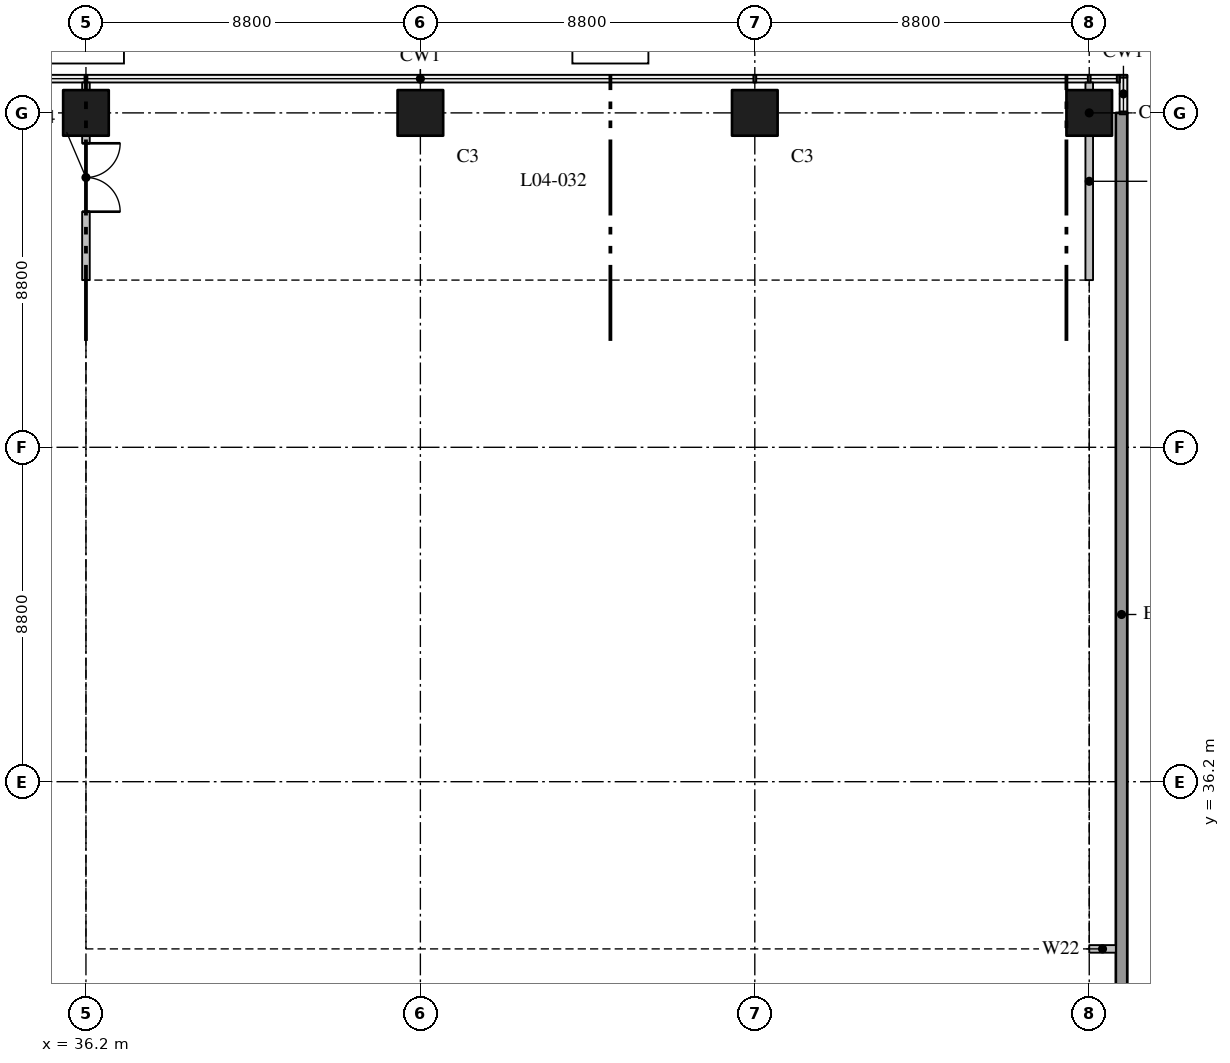
"""IFC4 building model, lengths in metres.
Left out: names, types, materials, properties, quantities, classifications, styles, units other than length and angle.
Written with IfcOpenShell. Run it as: python <this file> out.ifc"""

import sys

from ifc_helpers import new_model, si_unit, direction, frame, frame_2d, origin, origin_2d, place, context, subcontext, project, spatial, rectangle, extrude, element, fill, save


model = new_model("IFC4")
c1 = context("Model", 3, precision=1e-05, world=origin(), true_north=direction((0.0, 1.0)))
c2 = subcontext(c1, "Body", "Model", "MODEL_VIEW")
j1 = project(units=[si_unit("LENGTHUNIT", "METRE"), si_unit("PLANEANGLEUNIT", "RADIAN")], contexts=[c1])
p1 = place(None, origin())
s1 = spatial("IfcSite", under=j1, at=p1, CompositionType="ELEMENT")
p2 = place(p1, origin())
s2 = spatial("IfcBuilding", under=s1, at=p2, CompositionType="ELEMENT")
p3 = place(p2, frame((0.0, 0.0, 23.5)))
s3 = spatial("IfcBuildingStorey", under=s2, at=p3, CompositionType="ELEMENT", Elevation=23.5)
for number, where, z_axis, x_axis in (
    (1, (36.2, 53.8, 0.0), (0.0, 0.0, 1.0), (1.0, 0.0, 0.0)),
    (2, (45.0, 53.8, 0.0), (0.0, 0.0, 1.0), (1.0, 0.0, 0.0)),
    (3, (53.8, 53.8, 0.0), (0.0, 0.0, 1.0), (1.0, 0.0, 0.0)),
    (4, (62.6, 53.8, 0.0), (0.0, 0.0, 1.0), (1.0, 0.0, 0.0)),
):
    element("IfcColumn", number, at=place(p3, frame(where, z_axis=z_axis, x_axis=x_axis)), inside=s3, PredefinedType="COLUMN", context=c2, shape_type="SweptSolid", body=[
        extrude(rectangle(XDim=1.2, YDim=1.2, at=origin_2d()), origin(), (0.0, 0.0, 1.0), 5.5),
    ])
p4 = place(p3, frame((63.45, 27.4, 0.0), z_axis=(0.0, 0.0, 1.0), x_axis=(0.0, 1.0, 0.0)))
e5 = element("IfcWall", 5, at=p4, inside=s3, PredefinedType="STANDARD", context=c2, shape_type="SweptSolid", body=[
    extrude(rectangle(XDim=26.4, YDim=0.3, at=frame_2d((13.2, 0.0))), origin(), (0.0, 0.0, 1.0), 5.1),
])
p5 = place(p2, frame((0.0, 0.0, 18.0)))
s4 = spatial("IfcBuildingStorey", under=s2, at=p5, CompositionType="ELEMENT", Elevation=18.0)
p6 = place(p5, frame((36.1, 31.8, 0.0), z_axis=(0.0, 0.0, 1.0), x_axis=(1.0, 0.0, 0.0)))
e6 = element("IfcWall", 6, at=p6, inside=s4, PredefinedType="PARTITIONING", context=c2, shape_type="SweptSolid", body=[
    extrude(rectangle(XDim=26.5, YDim=0.2, at=frame_2d((13.25, 0.0))), origin(), (0.0, 0.0, 1.0), 8.0),
])
p7 = place(p6, frame((12.1, 0.0, 0.0)))
e7 = element("IfcOpeningElement", 7, at=p7, cuts=e6, PredefinedType="OPENING", context=c2, shape_type="SweptSolid", body=[
    extrude(rectangle(XDim=2.4, YDim=2.4, at=frame_2d((1.2, 1.2))), frame((0.0, 0.11, 0.0), z_axis=(0.0, -1.0, 0.0), x_axis=(1.0, 0.0, 0.0)), (0.0, 0.0, 1.0), 0.22),
])
p8 = place(p5, frame((36.1, 49.4, 0.0), z_axis=(0.0, 0.0, 1.0), x_axis=(1.0, 0.0, 0.0)))
e8 = element("IfcWall", 8, at=p8, inside=s4, PredefinedType="PARTITIONING", context=c2, shape_type="SweptSolid", body=[
    extrude(rectangle(XDim=26.6, YDim=0.2, at=frame_2d((13.3, 0.0))), origin(), (0.0, 0.0, 1.0), 8.0),
])
for number, where, z_axis, x_axis in (
    (9, (36.2, 31.9, 0.0), (0.0, 0.0, 1.0), (0.0, 1.0, 0.0)),
    (10, (62.6, 31.9, 0.0), (0.0, 0.0, 1.0), (0.0, 1.0, 0.0)),
):
    element("IfcWall", number, at=place(p5, frame(where, z_axis=z_axis, x_axis=x_axis)), inside=s4, PredefinedType="PARTITIONING", context=c2, shape_type="SweptSolid", body=[
        extrude(rectangle(XDim=17.4, YDim=0.2, at=frame_2d((8.7, 0.0))), origin(), (0.0, 0.0, 1.0), 8.0),
    ])
p9 = place(p3, frame((62.6, 31.8, 0.0), z_axis=(0.0, 0.0, 1.0), x_axis=(1.0, 0.0, 0.0)))
e11 = element("IfcWall", 11, at=p9, inside=s3, PredefinedType="PARTITIONING", context=c2, shape_type="SweptSolid", body=[
    extrude(rectangle(XDim=0.7, YDim=0.2, at=frame_2d((0.35, 0.0))), origin(), (0.0, 0.0, 1.0), 2.5),
])
p10 = place(p3, frame((36.2, 49.4, 0.0), z_axis=(0.0, 0.0, 1.0), x_axis=(0.0, 1.0, 0.0)))
e12 = element("IfcWall", 12, at=p10, inside=s3, PredefinedType="PARTITIONING", context=c2, shape_type="SweptSolid", body=[
    extrude(rectangle(XDim=5.2, YDim=0.2, at=frame_2d((2.6, 0.0))), origin(), (0.0, 0.0, 1.0), 2.5),
])
p11 = place(p10, frame((1.8, 0.0, 0.0)))
e13 = element("IfcOpeningElement", 13, at=p11, cuts=e12, PredefinedType="OPENING", context=c2, shape_type="SweptSolid", body=[
    extrude(rectangle(XDim=1.8, YDim=2.4, at=frame_2d((0.9, 1.2))), frame((0.0, 0.11, 0.0), z_axis=(0.0, -1.0, 0.0), x_axis=(1.0, 0.0, 0.0)), (0.0, 0.0, 1.0), 0.22),
])
p12 = place(p3, frame((62.6, 49.4, 0.0), z_axis=(0.0, 0.0, 1.0), x_axis=(0.0, 1.0, 0.0)))
e14 = element("IfcWall", 14, at=p12, inside=s3, PredefinedType="PARTITIONING", context=c2, shape_type="SweptSolid", body=[
    extrude(rectangle(XDim=5.2, YDim=0.2, at=frame_2d((2.6, 0.0))), origin(), (0.0, 0.0, 1.0), 2.5),
])
p13 = place(p11, frame((1.8, 0.0, 0.0), z_axis=(0.0, 0.0, 1.0), x_axis=(-1.0, 0.0, 0.0)))
e15 = element("IfcDoor", 15, at=p13, inside=s3, OperationType="DOUBLE_DOOR_SINGLE_SWING", PredefinedType="DOOR", context=c2, shape_type="SweptSolid", body=[
    extrude(rectangle(XDim=1.8, YDim=2.4, at=frame_2d((0.9, 1.2))), frame((0.0, 0.025, 0.0), z_axis=(0.0, -1.0, 0.0), x_axis=(1.0, 0.0, 0.0)), (0.0, 0.0, 1.0), 0.05),
])
fill(e13, e15)
save(model, sys.argv[1])
